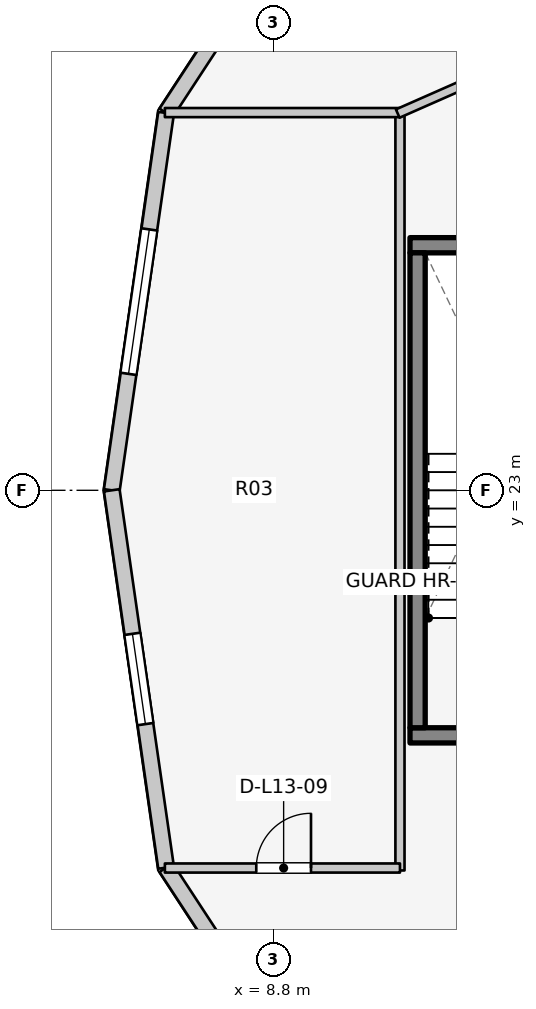
"""IFC4 building model, lengths in metres.
Left out: names, types, materials, properties, quantities, classifications, styles, units other than length and angle.
Written with IfcOpenShell. Run it as: python <this file> out.ifc"""

import sys

from ifc_helpers import new_model, si_unit, direction, frame, frame_2d, origin, place, context, subcontext, project, spatial, rectangle, extrude, element, fill, save


model = new_model("IFC4")
c1 = context("Model", 3, precision=1e-05, world=origin(), true_north=direction((0.0, 1.0)))
c2 = subcontext(c1, "Body", "Model", "MODEL_VIEW")
j1 = project(units=[si_unit("LENGTHUNIT", "METRE"), si_unit("PLANEANGLEUNIT", "RADIAN")], contexts=[c1])
p1 = place(None, origin())
s1 = spatial("IfcSite", under=j1, at=p1, CompositionType="ELEMENT")
p2 = place(p1, origin())
s2 = spatial("IfcBuilding", under=s1, at=p2, CompositionType="ELEMENT")
p3 = place(p2, frame((0.0, 0.0, 46.2)))
s3 = spatial("IfcBuildingStorey", under=s2, at=p3, CompositionType="ELEMENT", Elevation=46.2)
p4 = place(p3, frame((11.045, 18.97, 0.0), z_axis=(0.0, 0.0, 1.0), x_axis=(1.0, 0.0, 0.0)))
e1 = element("IfcWall", 1, at=p4, inside=s3, PredefinedType="SOLIDWALL", context=c2, shape_type="SweptSolid", body=[
    extrude(rectangle(XDim=3.782, YDim=0.25, at=frame_2d((1.891, 0.0))), origin(), (0.0, 0.0, 1.0), 3.1),
])
p5 = place(p4, frame((1.135, 0.0, 0.0)))
e2 = element("IfcOpeningElement", 2, at=p5, cuts=e1, PredefinedType="OPENING", context=c2, shape_type="SweptSolid", body=[
    extrude(rectangle(XDim=1.1, YDim=2.1, at=frame_2d((0.55, 1.05))), frame((0.0, 0.135, 0.0), z_axis=(0.0, -1.0, 0.0), x_axis=(1.0, 0.0, 0.0)), (0.0, 0.0, 1.0), 0.27),
])
p6 = place(p3, frame((11.045, 27.03, 0.0), z_axis=(0.0, 0.0, 1.0), x_axis=(1.0, 0.0, 0.0)))
e3 = element("IfcWall", 3, at=p6, inside=s3, PredefinedType="SOLIDWALL", context=c2, shape_type="SweptSolid", body=[
    extrude(rectangle(XDim=3.782, YDim=0.25, at=frame_2d((1.891, 0.0))), origin(), (0.0, 0.0, 1.0), 3.1),
])
p7 = place(p3, frame((11.17, 19.095, 0.0), z_axis=(0.0, 0.0, 1.0), x_axis=(0.0, 1.0, 0.0)))
e4 = element("IfcWall", 4, at=p7, inside=s3, PredefinedType="SOLIDWALL", context=c2, shape_type="SweptSolid", body=[
    extrude(rectangle(XDim=7.81, YDim=0.25, at=frame_2d((3.905, 0.0))), origin(), (0.0, 0.0, 1.0), 3.1),
])
p8 = place(p3, frame((9.806, 33.441, 0.0), z_axis=(0.0, 0.0, 1.0), x_axis=(-0.547702757047, -0.836672988642, 0.0)))
e5 = element("IfcWall", 5, at=p8, inside=s3, PredefinedType="STANDARD", context=c2, shape_type="SweptSolid", body=[
    extrude(rectangle(XDim=5.062, YDim=0.26, at=frame_2d((2.531, 0.0))), origin(), (0.0, 0.0, 1.0), 2.85),
])
p9 = place(p8, frame((1.781, 0.0, 0.75)))
e6 = element("IfcOpeningElement", 6, at=p9, cuts=e5, PredefinedType="OPENING", context=c2, shape_type="SweptSolid", body=[
    extrude(rectangle(XDim=1.5, YDim=1.6, at=frame_2d((0.75, 0.8))), frame((0.0, 0.14, 0.0), z_axis=(0.0, -1.0, 0.0), x_axis=(1.0, 0.0, 0.0)), (0.0, 0.0, 1.0), 0.28),
])
p10 = place(p3, frame((7.033, 29.205, 0.0), z_axis=(0.0, 0.0, 1.0), x_axis=(-0.142528001686, -0.989790770181, 0.0)))
e7 = element("IfcWall", 7, at=p10, inside=s3, PredefinedType="STANDARD", context=c2, shape_type="SweptSolid", body=[
    extrude(rectangle(XDim=6.269, YDim=0.26, at=frame_2d((3.135, 0.0))), origin(), (0.0, 0.0, 1.0), 2.85),
])
p11 = place(p10, frame((1.935, 0.0, 0.75)))
e8 = element("IfcOpeningElement", 8, at=p11, cuts=e7, PredefinedType="OPENING", context=c2, shape_type="SweptSolid", body=[
    extrude(rectangle(XDim=2.4, YDim=1.7, at=frame_2d((1.2, 0.85))), frame((0.0, 0.14, 0.0), z_axis=(0.0, -1.0, 0.0), x_axis=(1.0, 0.0, 0.0)), (0.0, 0.0, 1.0), 0.28),
])
p12 = place(p3, frame((6.14, 23.0, 0.0), z_axis=(0.0, 0.0, 1.0), x_axis=(0.142528001686, -0.989790770181, 0.0)))
e9 = element("IfcWall", 9, at=p12, inside=s3, PredefinedType="STANDARD", context=c2, shape_type="SweptSolid", body=[
    extrude(rectangle(XDim=6.269, YDim=0.26, at=frame_2d((3.135, 0.0))), origin(), (0.0, 0.0, 1.0), 2.85),
])
p13 = place(p12, frame((2.385, 0.0, 0.75)))
e10 = element("IfcOpeningElement", 10, at=p13, cuts=e9, PredefinedType="OPENING", context=c2, shape_type="SweptSolid", body=[
    extrude(rectangle(XDim=1.5, YDim=1.6, at=frame_2d((0.75, 0.8))), frame((0.0, 0.14, 0.0), z_axis=(0.0, -1.0, 0.0), x_axis=(1.0, 0.0, 0.0)), (0.0, 0.0, 1.0), 0.28),
])
p14 = place(p3, frame((7.033, 16.795, 0.0), z_axis=(0.0, 0.0, 1.0), x_axis=(0.547702757047, -0.836672988642, 0.0)))
e11 = element("IfcWall", 11, at=p14, inside=s3, PredefinedType="STANDARD", context=c2, shape_type="SweptSolid", body=[
    extrude(rectangle(XDim=5.062, YDim=0.26, at=frame_2d((2.531, 0.0))), origin(), (0.0, 0.0, 1.0), 2.85),
])
p15 = place(p14, frame((1.781, 0.0, 0.75)))
e12 = element("IfcOpeningElement", 12, at=p15, cuts=e11, PredefinedType="OPENING", context=c2, shape_type="SweptSolid", body=[
    extrude(rectangle(XDim=1.5, YDim=1.6, at=frame_2d((0.75, 0.8))), frame((0.0, 0.14, 0.0), z_axis=(0.0, -1.0, 0.0), x_axis=(1.0, 0.0, 0.0)), (0.0, 0.0, 1.0), 0.28),
])
p16 = place(p3, frame((10.88, 16.748, 0.0), z_axis=(0.0, 0.0, 1.0), x_axis=(0.0, 1.0, 0.0)))
e13 = element("IfcWall", 13, at=p16, inside=s3, PredefinedType="PARTITIONING", context=c2, shape_type="SweptSolid", body=[
    extrude(rectangle(XDim=12.503, YDim=0.15, at=frame_2d((6.252, 0.0))), origin(), (0.0, 0.0, 1.0), 2.12),
])
p17 = place(p3, frame((7.014, 16.788, 0.0), z_axis=(0.0, 0.0, 1.0), x_axis=(1.0, 0.0, 0.0)))
e14 = element("IfcWall", 14, at=p17, inside=s3, PredefinedType="PARTITIONING", context=c2, shape_type="SweptSolid", body=[
    extrude(rectangle(XDim=3.866, YDim=0.15, at=frame_2d((1.933, 0.0))), origin(), (0.0, 0.0, 1.0), 2.855),
])
p18 = place(p17, frame((1.503, 0.0, 0.0)))
e15 = element("IfcOpeningElement", 15, at=p18, cuts=e14, PredefinedType="OPENING", context=c2, shape_type="SweptSolid", body=[
    extrude(rectangle(XDim=0.9, YDim=2.1, at=frame_2d((0.45, 1.05))), frame((0.0, 0.085, 0.0), z_axis=(0.0, -1.0, 0.0), x_axis=(1.0, 0.0, 0.0)), (0.0, 0.0, 1.0), 0.17),
])
p19 = place(p3, frame((7.014, 29.212, 0.0), z_axis=(0.0, 0.0, 1.0), x_axis=(1.0, 0.0, 0.0)))
e16 = element("IfcWall", 16, at=p19, inside=s3, PredefinedType="PARTITIONING", context=c2, shape_type="SweptSolid", body=[
    extrude(rectangle(XDim=3.866, YDim=0.15, at=frame_2d((1.933, 0.0))), origin(), (0.0, 0.0, 1.0), 2.855),
])
p20 = place(p3, frame((10.844, 29.196, 0.0), z_axis=(0.0, 0.0, 1.0), x_axis=(0.91502756289, 0.403391322604, 0.0)))
e17 = element("IfcWall", 17, at=p20, inside=s3, PredefinedType="PARTITIONING", context=c2, shape_type="SweptSolid", body=[
    extrude(rectangle(XDim=4.637, YDim=0.15, at=frame_2d((2.319, 0.0))), origin(), (0.0, 0.0, 1.0), 2.069),
])
p21 = place(p11, origin())
e18 = element("IfcWindow", 18, at=p21, inside=s3, PartitioningType="SINGLE_PANEL", PredefinedType="WINDOW", context=c2, shape_type="SweptSolid", body=[
    extrude(rectangle(XDim=2.4, YDim=1.7, at=frame_2d((1.2, 0.85))), frame((0.0, 0.03, 0.0), z_axis=(0.0, -1.0, 0.0), x_axis=(1.0, 0.0, 0.0)), (0.0, 0.0, 1.0), 0.06),
])
fill(e8, e18)
p22 = place(p13, origin())
e19 = element("IfcWindow", 19, at=p22, inside=s3, PartitioningType="SINGLE_PANEL", PredefinedType="WINDOW", context=c2, shape_type="SweptSolid", body=[
    extrude(rectangle(XDim=1.5, YDim=1.6, at=frame_2d((0.75, 0.8))), frame((0.0, 0.03, 0.0), z_axis=(0.0, -1.0, 0.0), x_axis=(1.0, 0.0, 0.0)), (0.0, 0.0, 1.0), 0.06),
])
fill(e10, e19)
p23 = place(p18, origin())
e20 = element("IfcDoor", 20, at=p23, inside=s3, OperationType="SINGLE_SWING_RIGHT", PredefinedType="DOOR", context=c2, shape_type="SweptSolid", body=[
    extrude(rectangle(XDim=0.9, YDim=2.1, at=frame_2d((0.45, 1.05))), frame((0.0, 0.025, 0.0), z_axis=(0.0, -1.0, 0.0), x_axis=(1.0, 0.0, 0.0)), (0.0, 0.0, 1.0), 0.05),
])
fill(e15, e20)
save(model, sys.argv[1])
